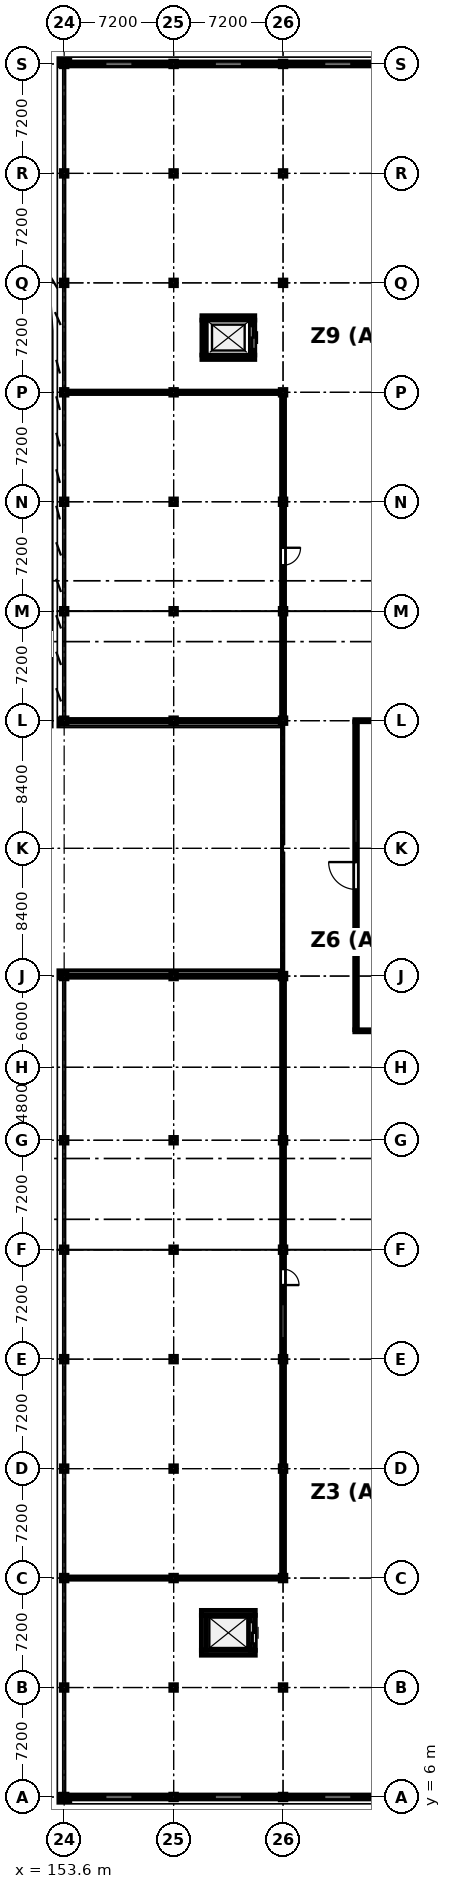
"""IFC4 building model, lengths in metres.
Left out: names, types, materials, properties, quantities, classifications, styles, units other than length and angle.
Written with IfcOpenShell. Run it as: python <this file> out.ifc"""

import sys

from ifc_helpers import new_model, si_unit, direction, frame, frame_2d, origin, origin_2d, place, context, subcontext, project, spatial, rectangle, i_section, extrude, element, fill, save


model = new_model("IFC4")
c1 = context("Model", 3, precision=1e-05, world=origin(), true_north=direction((0.0, 1.0)))
c2 = subcontext(c1, "Body", "Model", "MODEL_VIEW")
j1 = project(units=[si_unit("LENGTHUNIT", "METRE"), si_unit("PLANEANGLEUNIT", "RADIAN")], contexts=[c1])
p1 = place(None, origin())
s1 = spatial("IfcSite", under=j1, at=p1, CompositionType="ELEMENT")
p2 = place(p1, origin())
s2 = spatial("IfcBuilding", under=s1, at=p2, CompositionType="ELEMENT")
p3 = place(p2, frame((0.0, 0.0, 5.4)))
s3 = spatial("IfcBuildingStorey", under=s2, at=p3, CompositionType="ELEMENT", Elevation=5.4)
for number, where, z_axis, x_axis in (
    (1, (153.6, 6.0, 0.0), (0.0, 0.0, 1.0), (1.0, 0.0, 0.0)),
    (2, (153.6, 13.2, 0.0), (0.0, 0.0, 1.0), (1.0, 0.0, 0.0)),
    (3, (153.6, 20.4, 0.0), (0.0, 0.0, 1.0), (1.0, 0.0, 0.0)),
    (4, (153.6, 27.6, 0.0), (0.0, 0.0, 1.0), (1.0, 0.0, 0.0)),
    (5, (153.6, 34.8, 0.0), (0.0, 0.0, 1.0), (1.0, 0.0, 0.0)),
    (6, (153.6, 42.0, 0.0), (0.0, 0.0, 1.0), (1.0, 0.0, 0.0)),
    (7, (153.6, 49.2, 0.0), (0.0, 0.0, 1.0), (1.0, 0.0, 0.0)),
    (8, (153.6, 60.0, 0.0), (0.0, 0.0, 1.0), (1.0, 0.0, 0.0)),
    (9, (153.6, 76.8, 0.0), (0.0, 0.0, 1.0), (1.0, 0.0, 0.0)),
    (10, (153.6, 84.0, 0.0), (0.0, 0.0, 1.0), (1.0, 0.0, 0.0)),
    (11, (153.6, 91.2, 0.0), (0.0, 0.0, 1.0), (1.0, 0.0, 0.0)),
    (12, (153.6, 98.4, 0.0), (0.0, 0.0, 1.0), (1.0, 0.0, 0.0)),
    (13, (153.6, 105.6, 0.0), (0.0, 0.0, 1.0), (1.0, 0.0, 0.0)),
    (14, (153.6, 112.8, 0.0), (0.0, 0.0, 1.0), (1.0, 0.0, 0.0)),
    (15, (153.6, 120.0, 0.0), (0.0, 0.0, 1.0), (1.0, 0.0, 0.0)),
    (16, (160.8, 6.0, 0.0), (0.0, 0.0, 1.0), (1.0, 0.0, 0.0)),
    (17, (160.8, 13.2, 0.0), (0.0, 0.0, 1.0), (1.0, 0.0, 0.0)),
    (18, (160.8, 20.4, 0.0), (0.0, 0.0, 1.0), (1.0, 0.0, 0.0)),
    (19, (160.8, 27.6, 0.0), (0.0, 0.0, 1.0), (1.0, 0.0, 0.0)),
    (20, (160.8, 34.8, 0.0), (0.0, 0.0, 1.0), (1.0, 0.0, 0.0)),
    (21, (160.8, 42.0, 0.0), (0.0, 0.0, 1.0), (1.0, 0.0, 0.0)),
    (22, (160.8, 49.2, 0.0), (0.0, 0.0, 1.0), (1.0, 0.0, 0.0)),
    (23, (160.8, 60.0, 0.0), (0.0, 0.0, 1.0), (1.0, 0.0, 0.0)),
    (24, (160.8, 76.8, 0.0), (0.0, 0.0, 1.0), (1.0, 0.0, 0.0)),
    (25, (160.8, 84.0, 0.0), (0.0, 0.0, 1.0), (1.0, 0.0, 0.0)),
    (26, (160.8, 91.2, 0.0), (0.0, 0.0, 1.0), (1.0, 0.0, 0.0)),
    (27, (160.8, 98.4, 0.0), (0.0, 0.0, 1.0), (1.0, 0.0, 0.0)),
    (28, (160.8, 105.6, 0.0), (0.0, 0.0, 1.0), (1.0, 0.0, 0.0)),
    (29, (160.8, 112.8, 0.0), (0.0, 0.0, 1.0), (1.0, 0.0, 0.0)),
    (30, (160.8, 120.0, 0.0), (0.0, 0.0, 1.0), (1.0, 0.0, 0.0)),
    (31, (168.0, 6.0, 0.0), (0.0, 0.0, 1.0), (1.0, 0.0, 0.0)),
    (32, (168.0, 13.2, 0.0), (0.0, 0.0, 1.0), (1.0, 0.0, 0.0)),
    (33, (168.0, 20.4, 0.0), (0.0, 0.0, 1.0), (1.0, 0.0, 0.0)),
    (34, (168.0, 27.6, 0.0), (0.0, 0.0, 1.0), (1.0, 0.0, 0.0)),
    (35, (168.0, 34.8, 0.0), (0.0, 0.0, 1.0), (1.0, 0.0, 0.0)),
    (36, (168.0, 42.0, 0.0), (0.0, 0.0, 1.0), (1.0, 0.0, 0.0)),
    (37, (168.0, 49.2, 0.0), (0.0, 0.0, 1.0), (1.0, 0.0, 0.0)),
    (38, (168.0, 60.0, 0.0), (0.0, 0.0, 1.0), (1.0, 0.0, 0.0)),
    (39, (168.0, 76.8, 0.0), (0.0, 0.0, 1.0), (1.0, 0.0, 0.0)),
    (40, (168.0, 84.0, 0.0), (0.0, 0.0, 1.0), (1.0, 0.0, 0.0)),
    (41, (168.0, 91.2, 0.0), (0.0, 0.0, 1.0), (1.0, 0.0, 0.0)),
    (42, (168.0, 98.4, 0.0), (0.0, 0.0, 1.0), (1.0, 0.0, 0.0)),
    (43, (168.0, 105.6, 0.0), (0.0, 0.0, 1.0), (1.0, 0.0, 0.0)),
    (44, (168.0, 112.8, 0.0), (0.0, 0.0, 1.0), (1.0, 0.0, 0.0)),
    (45, (168.0, 120.0, 0.0), (0.0, 0.0, 1.0), (1.0, 0.0, 0.0)),
):
    element("IfcColumn", number, at=place(p3, frame(where, z_axis=z_axis, x_axis=x_axis)), inside=s3, PredefinedType="COLUMN", context=c2, shape_type="SweptSolid", body=[
        extrude(i_section(OverallWidth=0.373, OverallDepth=0.373, WebThickness=0.016, FlangeThickness=0.026, FilletRadius=0.015, at=origin_2d()), origin(), (0.0, 0.0, 1.0), 3.9),
    ])
p4 = place(p3, frame((160.606, 6.0, 0.0), z_axis=(0.0, 0.0, 1.0), x_axis=(-1.0, 0.0, 0.0)))
e46 = element("IfcWall", 46, at=p4, inside=s3, PredefinedType="STANDARD", context=c2, shape_type="SweptSolid", body=[
    extrude(rectangle(XDim=6.812, YDim=0.26, at=frame_2d((3.406, 0.0))), origin(), (0.0, 0.0, 1.0), 3.043),
])
p5 = place(p4, frame((2.506, 0.0, 0.9)))
e47 = element("IfcOpeningElement", 47, at=p5, cuts=e46, PredefinedType="OPENING", context=c2, shape_type="SweptSolid", body=[
    extrude(rectangle(XDim=1.8, YDim=1.5, at=frame_2d((0.9, 0.75))), frame((0.0, 0.14, 0.0), z_axis=(0.0, -1.0, 0.0), x_axis=(1.0, 0.0, 0.0)), (0.0, 0.0, 1.0), 0.28),
])
p6 = place(p3, frame((153.794, 120.0, 0.0), z_axis=(0.0, 0.0, 1.0), x_axis=(1.0, 0.0, 0.0)))
e48 = element("IfcWall", 48, at=p6, inside=s3, PredefinedType="STANDARD", context=c2, shape_type="SweptSolid", body=[
    extrude(rectangle(XDim=6.812, YDim=0.26, at=frame_2d((3.406, 0.0))), origin(), (0.0, 0.0, 1.0), 3.043),
])
p7 = place(p6, frame((2.506, 0.0, 0.9)))
e49 = element("IfcOpeningElement", 49, at=p7, cuts=e48, PredefinedType="OPENING", context=c2, shape_type="SweptSolid", body=[
    extrude(rectangle(XDim=1.8, YDim=1.5, at=frame_2d((0.9, 0.75))), frame((0.0, 0.14, 0.0), z_axis=(0.0, -1.0, 0.0), x_axis=(1.0, 0.0, 0.0)), (0.0, 0.0, 1.0), 0.28),
])
p8 = place(p3, frame((167.806, 6.0, 0.0), z_axis=(0.0, 0.0, 1.0), x_axis=(-1.0, 0.0, 0.0)))
e50 = element("IfcWall", 50, at=p8, inside=s3, PredefinedType="STANDARD", context=c2, shape_type="SweptSolid", body=[
    extrude(rectangle(XDim=6.812, YDim=0.26, at=frame_2d((3.406, 0.0))), origin(), (0.0, 0.0, 1.0), 3.043),
])
p9 = place(p8, frame((2.506, 0.0, 0.9)))
e51 = element("IfcOpeningElement", 51, at=p9, cuts=e50, PredefinedType="OPENING", context=c2, shape_type="SweptSolid", body=[
    extrude(rectangle(XDim=1.8, YDim=1.5, at=frame_2d((0.9, 0.75))), frame((0.0, 0.14, 0.0), z_axis=(0.0, -1.0, 0.0), x_axis=(1.0, 0.0, 0.0)), (0.0, 0.0, 1.0), 0.28),
])
p10 = place(p3, frame((160.994, 120.0, 0.0), z_axis=(0.0, 0.0, 1.0), x_axis=(1.0, 0.0, 0.0)))
e52 = element("IfcWall", 52, at=p10, inside=s3, PredefinedType="STANDARD", context=c2, shape_type="SweptSolid", body=[
    extrude(rectangle(XDim=6.812, YDim=0.26, at=frame_2d((3.406, 0.0))), origin(), (0.0, 0.0, 1.0), 3.043),
])
p11 = place(p10, frame((2.506, 0.0, 0.9)))
e53 = element("IfcOpeningElement", 53, at=p11, cuts=e52, PredefinedType="OPENING", context=c2, shape_type="SweptSolid", body=[
    extrude(rectangle(XDim=1.8, YDim=1.5, at=frame_2d((0.9, 0.75))), frame((0.0, 0.14, 0.0), z_axis=(0.0, -1.0, 0.0), x_axis=(1.0, 0.0, 0.0)), (0.0, 0.0, 1.0), 0.28),
])
p12 = place(p3, frame((175.006, 6.0, 0.0), z_axis=(0.0, 0.0, 1.0), x_axis=(-1.0, 0.0, 0.0)))
e54 = element("IfcWall", 54, at=p12, inside=s3, PredefinedType="STANDARD", context=c2, shape_type="SweptSolid", body=[
    extrude(rectangle(XDim=6.812, YDim=0.26, at=frame_2d((3.406, 0.0))), origin(), (0.0, 0.0, 1.0), 3.043),
])
p13 = place(p12, frame((2.506, 0.0, 0.9)))
e55 = element("IfcOpeningElement", 55, at=p13, cuts=e54, PredefinedType="OPENING", context=c2, shape_type="SweptSolid", body=[
    extrude(rectangle(XDim=1.8, YDim=1.5, at=frame_2d((0.9, 0.75))), frame((0.0, 0.14, 0.0), z_axis=(0.0, -1.0, 0.0), x_axis=(1.0, 0.0, 0.0)), (0.0, 0.0, 1.0), 0.28),
])
p14 = place(p3, frame((168.194, 120.0, 0.0), z_axis=(0.0, 0.0, 1.0), x_axis=(1.0, 0.0, 0.0)))
e56 = element("IfcWall", 56, at=p14, inside=s3, PredefinedType="STANDARD", context=c2, shape_type="SweptSolid", body=[
    extrude(rectangle(XDim=6.812, YDim=0.26, at=frame_2d((3.406, 0.0))), origin(), (0.0, 0.0, 1.0), 3.043),
])
p15 = place(p14, frame((2.506, 0.0, 0.9)))
e57 = element("IfcOpeningElement", 57, at=p15, cuts=e56, PredefinedType="OPENING", context=c2, shape_type="SweptSolid", body=[
    extrude(rectangle(XDim=1.8, YDim=1.5, at=frame_2d((0.9, 0.75))), frame((0.0, 0.14, 0.0), z_axis=(0.0, -1.0, 0.0), x_axis=(1.0, 0.0, 0.0)), (0.0, 0.0, 1.0), 0.28),
])
for number, where, z_axis, x_axis in (
    (58, (166.175, 15.488, 0.0), (0.0, 0.0, 1.0), (-1.0, 0.0, 0.0)),
    (59, (162.625, 18.112, 0.0), (0.0, 0.0, 1.0), (1.0, 0.0, 0.0)),
):
    element("IfcWall", number, at=place(p3, frame(where, z_axis=z_axis, x_axis=x_axis)), inside=s3, PredefinedType="SHEAR", context=c2, shape_type="SweptSolid", body=[
        extrude(rectangle(XDim=3.55, YDim=0.325, at=frame_2d((1.775, 0.0))), origin(), (0.0, 0.0, 1.0), 3.67),
    ])
p16 = place(p3, frame((162.788, 15.65, 0.0), z_axis=(0.0, 0.0, 1.0), x_axis=(0.0, 1.0, 0.0)))
e60 = element("IfcWall", 60, at=p16, inside=s3, PredefinedType="SHEAR", context=c2, shape_type="SweptSolid", body=[
    extrude(rectangle(XDim=2.3, YDim=0.325, at=frame_2d((1.15, 0.0))), origin(), (0.0, 0.0, 1.0), 3.67),
])
p17 = place(p3, frame((166.012, 17.95, 0.0), z_axis=(0.0, 0.0, 1.0), x_axis=(0.0, -1.0, 0.0)))
e61 = element("IfcWall", 61, at=p17, inside=s3, PredefinedType="SHEAR", context=c2, shape_type="SweptSolid", body=[
    extrude(rectangle(XDim=2.3, YDim=0.325, at=frame_2d((1.15, 0.0))), origin(), (0.0, 0.0, 1.0), 3.67),
])
p18 = place(p17, frame((0.45, 0.0, 0.0)))
e62 = element("IfcOpeningElement", 62, at=p18, cuts=e61, PredefinedType="OPENING", context=c2, shape_type="SweptSolid", body=[
    extrude(rectangle(XDim=1.4, YDim=2.3, at=frame_2d((0.7, 1.15))), frame((0.0, 0.172, 0.0), z_axis=(0.0, -1.0, 0.0), x_axis=(1.0, 0.0, 0.0)), (0.0, 0.0, 1.0), 0.345),
])
for number, where, z_axis, x_axis in (
    (63, (166.14, 100.705, 0.0), (0.0, 0.0, 1.0), (-1.0, 0.0, 0.0)),
    (64, (162.66, 103.295, 0.0), (0.0, 0.0, 1.0), (1.0, 0.0, 0.0)),
):
    element("IfcWall", number, at=place(p3, frame(where, z_axis=z_axis, x_axis=x_axis)), inside=s3, PredefinedType="SHEAR", context=c2, shape_type="SweptSolid", body=[
        extrude(rectangle(XDim=3.48, YDim=0.29, at=frame_2d((1.74, 0.0))), origin(), (0.0, 0.0, 1.0), 3.67),
    ])
p19 = place(p3, frame((162.805, 100.85, 0.0), z_axis=(0.0, 0.0, 1.0), x_axis=(0.0, 1.0, 0.0)))
e65 = element("IfcWall", 65, at=p19, inside=s3, PredefinedType="SHEAR", context=c2, shape_type="SweptSolid", body=[
    extrude(rectangle(XDim=2.3, YDim=0.29, at=frame_2d((1.15, 0.0))), origin(), (0.0, 0.0, 1.0), 3.67),
])
p20 = place(p3, frame((165.995, 103.15, 0.0), z_axis=(0.0, 0.0, 1.0), x_axis=(0.0, -1.0, 0.0)))
e66 = element("IfcWall", 66, at=p20, inside=s3, PredefinedType="SHEAR", context=c2, shape_type="SweptSolid", body=[
    extrude(rectangle(XDim=2.3, YDim=0.29, at=frame_2d((1.15, 0.0))), origin(), (0.0, 0.0, 1.0), 3.67),
])
p21 = place(p20, frame((0.4, 0.0, 0.0)))
e67 = element("IfcOpeningElement", 67, at=p21, cuts=e66, PredefinedType="OPENING", context=c2, shape_type="SweptSolid", body=[
    extrude(rectangle(XDim=1.5, YDim=2.3, at=frame_2d((0.75, 1.15))), frame((0.0, 0.155, 0.0), z_axis=(0.0, -1.0, 0.0), x_axis=(1.0, 0.0, 0.0)), (0.0, 0.0, 1.0), 0.31),
])
p22 = place(p3, frame((203.868, 56.4, 0.0), z_axis=(0.0, 0.0, 1.0), x_axis=(-1.0, 0.0, 0.0)))
e68 = element("IfcWall", 68, at=p22, inside=s3, PredefinedType="PARTITIONING", context=c2, shape_type="SweptSolid", body=[
    extrude(rectangle(XDim=31.148, YDim=0.135, at=frame_2d((15.574, 0.0))), origin(), (0.0, 0.0, 1.0), 3.038),
])
p23 = place(p3, frame((172.72, 76.8, 0.0), z_axis=(0.0, 0.0, 1.0), x_axis=(1.0, 0.0, 0.0)))
e69 = element("IfcWall", 69, at=p23, inside=s3, PredefinedType="PARTITIONING", context=c2, shape_type="SweptSolid", body=[
    extrude(rectangle(XDim=31.148, YDim=0.14, at=frame_2d((15.574, 0.0))), origin(), (0.0, 0.0, 1.0), 3.038),
])
p24 = place(p3, frame((168.08, 20.4, 0.0), z_axis=(0.0, 0.0, 1.0), x_axis=(-1.0, 0.0, 0.0)))
e70 = element("IfcWall", 70, at=p24, inside=s3, PredefinedType="PARTITIONING", context=c2, shape_type="SweptSolid", body=[
    extrude(rectangle(XDim=14.348, YDim=0.15, at=frame_2d((7.174, 0.0))), origin(), (0.0, 0.0, 1.0), 3.038),
])
p25 = place(p3, frame((153.732, 60.0, 0.0), z_axis=(0.0, 0.0, 1.0), x_axis=(1.0, 0.0, 0.0)))
e71 = element("IfcWall", 71, at=p25, inside=s3, PredefinedType="PARTITIONING", context=c2, shape_type="SweptSolid", body=[
    extrude(rectangle(XDim=14.348, YDim=0.155, at=frame_2d((7.174, 0.0))), origin(), (0.0, 0.0, 1.0), 3.038),
])
p26 = place(p3, frame((168.08, 76.8, 0.0), z_axis=(0.0, 0.0, 1.0), x_axis=(-1.0, 0.0, 0.0)))
e72 = element("IfcWall", 72, at=p26, inside=s3, PredefinedType="PARTITIONING", context=c2, shape_type="SweptSolid", body=[
    extrude(rectangle(XDim=14.348, YDim=0.16, at=frame_2d((7.174, 0.0))), origin(), (0.0, 0.0, 1.0), 3.038),
])
p27 = place(p3, frame((153.732, 98.4, 0.0), z_axis=(0.0, 0.0, 1.0), x_axis=(1.0, 0.0, 0.0)))
e73 = element("IfcWall", 73, at=p27, inside=s3, PredefinedType="PARTITIONING", context=c2, shape_type="SweptSolid", body=[
    extrude(rectangle(XDim=14.348, YDim=0.165, at=frame_2d((7.174, 0.0))), origin(), (0.0, 0.0, 1.0), 3.038),
])
p28 = place(p3, frame((172.8, 56.47, 0.0), z_axis=(0.0, 0.0, 1.0), x_axis=(0.0, 1.0, 0.0)))
e74 = element("IfcWall", 74, at=p28, inside=s3, PredefinedType="PARTITIONING", context=c2, shape_type="SweptSolid", body=[
    extrude(rectangle(XDim=20.258, YDim=0.178, at=frame_2d((10.129, 0.0))), origin(), (0.0, 0.0, 1.0), 3.038),
])
p29 = place(p28, frame((9.229, 0.0, 0.0)))
e75 = element("IfcOpeningElement", 75, at=p29, cuts=e74, PredefinedType="OPENING", context=c2, shape_type="SweptSolid", body=[
    extrude(rectangle(XDim=1.8, YDim=2.28, at=frame_2d((0.9, 1.14))), frame((0.0, 0.099, 0.0), z_axis=(0.0, -1.0, 0.0), x_axis=(1.0, 0.0, 0.0)), (0.0, 0.0, 1.0), 0.198),
])
p30 = place(p28, frame((12.279, 0.0, 0.95)))
e76 = element("IfcOpeningElement", 76, at=p30, cuts=e74, PredefinedType="OPENING", context=c2, shape_type="SweptSolid", body=[
    extrude(rectangle(XDim=1.6, YDim=1.45, at=frame_2d((0.8, 0.725))), frame((0.0, 0.099, 0.0), z_axis=(0.0, -1.0, 0.0), x_axis=(1.0, 0.0, 0.0)), (0.0, 0.0, 1.0), 0.198),
])
p31 = place(p3, frame((168.0, 59.92, 0.0), z_axis=(0.0, 0.0, 1.0), x_axis=(0.0, -1.0, 0.0)))
e77 = element("IfcWall", 77, at=p31, inside=s3, PredefinedType="PARTITIONING", context=c2, shape_type="SweptSolid", body=[
    extrude(rectangle(XDim=39.443, YDim=0.192, at=frame_2d((19.721, 0.0))), origin(), (0.0, 0.0, 1.0), 3.038),
])
p32 = place(p31, frame((19.196, 0.0, 0.0)))
e78 = element("IfcOpeningElement", 78, at=p32, cuts=e77, PredefinedType="OPENING", context=c2, shape_type="SweptSolid", body=[
    extrude(rectangle(XDim=1.05, YDim=2.34, at=frame_2d((0.525, 1.17))), frame((0.0, 0.106, 0.0), z_axis=(0.0, -1.0, 0.0), x_axis=(1.0, 0.0, 0.0)), (0.0, 0.0, 1.0), 0.212),
])
p33 = place(p31, frame((21.496, 0.0, 0.95)))
e79 = element("IfcOpeningElement", 79, at=p33, cuts=e77, PredefinedType="OPENING", context=c2, shape_type="SweptSolid", body=[
    extrude(rectangle(XDim=2.25, YDim=1.45, at=frame_2d((1.125, 0.725))), frame((0.0, 0.106, 0.0), z_axis=(0.0, -1.0, 0.0), x_axis=(1.0, 0.0, 0.0)), (0.0, 0.0, 1.0), 0.212),
])
p34 = place(p3, frame((168.0, 98.316, 0.0), z_axis=(0.0, 0.0, 1.0), x_axis=(0.0, -1.0, 0.0)))
e80 = element("IfcWall", 80, at=p34, inside=s3, PredefinedType="PARTITIONING", context=c2, shape_type="SweptSolid", body=[
    extrude(rectangle(XDim=21.434, YDim=0.198, at=frame_2d((10.717, 0.0))), origin(), (0.0, 0.0, 1.0), 3.038),
])
p35 = place(p34, frame((10.142, 0.0, 0.0)))
e81 = element("IfcOpeningElement", 81, at=p35, cuts=e80, PredefinedType="OPENING", context=c2, shape_type="SweptSolid", body=[
    extrude(rectangle(XDim=1.15, YDim=2.34, at=frame_2d((0.575, 1.17))), frame((0.0, 0.109, 0.0), z_axis=(0.0, -1.0, 0.0), x_axis=(1.0, 0.0, 0.0)), (0.0, 0.0, 1.0), 0.218),
])
p36 = place(p5, origin())
e82 = element("IfcWindow", 82, at=p36, inside=s3, PartitioningType="SINGLE_PANEL", PredefinedType="WINDOW", context=c2, shape_type="SweptSolid", body=[
    extrude(rectangle(XDim=1.8, YDim=1.5, at=frame_2d((0.9, 0.75))), frame((0.0, 0.03, 0.0), z_axis=(0.0, -1.0, 0.0), x_axis=(1.0, 0.0, 0.0)), (0.0, 0.0, 1.0), 0.06),
])
fill(e47, e82)
p37 = place(p7, origin())
e83 = element("IfcWindow", 83, at=p37, inside=s3, PartitioningType="SINGLE_PANEL", PredefinedType="WINDOW", context=c2, shape_type="SweptSolid", body=[
    extrude(rectangle(XDim=1.8, YDim=1.5, at=frame_2d((0.9, 0.75))), frame((0.0, 0.03, 0.0), z_axis=(0.0, -1.0, 0.0), x_axis=(1.0, 0.0, 0.0)), (0.0, 0.0, 1.0), 0.06),
])
fill(e49, e83)
p38 = place(p9, origin())
e84 = element("IfcWindow", 84, at=p38, inside=s3, PartitioningType="SINGLE_PANEL", PredefinedType="WINDOW", context=c2, shape_type="SweptSolid", body=[
    extrude(rectangle(XDim=1.8, YDim=1.5, at=frame_2d((0.9, 0.75))), frame((0.0, 0.03, 0.0), z_axis=(0.0, -1.0, 0.0), x_axis=(1.0, 0.0, 0.0)), (0.0, 0.0, 1.0), 0.06),
])
fill(e51, e84)
p39 = place(p11, origin())
e85 = element("IfcWindow", 85, at=p39, inside=s3, PartitioningType="SINGLE_PANEL", PredefinedType="WINDOW", context=c2, shape_type="SweptSolid", body=[
    extrude(rectangle(XDim=1.8, YDim=1.5, at=frame_2d((0.9, 0.75))), frame((0.0, 0.03, 0.0), z_axis=(0.0, -1.0, 0.0), x_axis=(1.0, 0.0, 0.0)), (0.0, 0.0, 1.0), 0.06),
])
fill(e53, e85)
p40 = place(p13, origin())
e86 = element("IfcWindow", 86, at=p40, inside=s3, PartitioningType="SINGLE_PANEL", PredefinedType="WINDOW", context=c2, shape_type="SweptSolid", body=[
    extrude(rectangle(XDim=1.8, YDim=1.5, at=frame_2d((0.9, 0.75))), frame((0.0, 0.03, 0.0), z_axis=(0.0, -1.0, 0.0), x_axis=(1.0, 0.0, 0.0)), (0.0, 0.0, 1.0), 0.06),
])
fill(e55, e86)
p41 = place(p15, origin())
e87 = element("IfcWindow", 87, at=p41, inside=s3, PartitioningType="SINGLE_PANEL", PredefinedType="WINDOW", context=c2, shape_type="SweptSolid", body=[
    extrude(rectangle(XDim=1.8, YDim=1.5, at=frame_2d((0.9, 0.75))), frame((0.0, 0.03, 0.0), z_axis=(0.0, -1.0, 0.0), x_axis=(1.0, 0.0, 0.0)), (0.0, 0.0, 1.0), 0.06),
])
fill(e57, e87)
p42 = place(p18, origin())
e88 = element("IfcDoor", 88, at=p42, inside=s3, OperationType="DOUBLE_DOOR_SLIDING", PredefinedType="DOOR", context=c2, shape_type="SweptSolid", body=[
    extrude(rectangle(XDim=1.4, YDim=2.3, at=frame_2d((0.7, 1.15))), frame((0.0, 0.025, 0.0), z_axis=(0.0, -1.0, 0.0), x_axis=(1.0, 0.0, 0.0)), (0.0, 0.0, 1.0), 0.05),
])
fill(e62, e88)
p43 = place(p21, origin())
e89 = element("IfcDoor", 89, at=p43, inside=s3, OperationType="DOUBLE_DOOR_SLIDING", PredefinedType="DOOR", context=c2, shape_type="SweptSolid", body=[
    extrude(rectangle(XDim=1.5, YDim=2.3, at=frame_2d((0.75, 1.15))), frame((0.0, 0.025, 0.0), z_axis=(0.0, -1.0, 0.0), x_axis=(1.0, 0.0, 0.0)), (0.0, 0.0, 1.0), 0.05),
])
fill(e67, e89)
p44 = place(p29, origin())
e90 = element("IfcDoor", 90, at=p44, inside=s3, OperationType="SINGLE_SWING_RIGHT", PredefinedType="DOOR", context=c2, shape_type="SweptSolid", body=[
    extrude(rectangle(XDim=1.8, YDim=2.28, at=frame_2d((0.9, 1.14))), frame((0.0, 0.025, 0.0), z_axis=(0.0, -1.0, 0.0), x_axis=(1.0, 0.0, 0.0)), (0.0, 0.0, 1.0), 0.05),
])
fill(e75, e90)
p45 = place(p30, origin())
e91 = element("IfcWindow", 91, at=p45, inside=s3, PartitioningType="SINGLE_PANEL", PredefinedType="WINDOW", context=c2, shape_type="SweptSolid", body=[
    extrude(rectangle(XDim=1.6, YDim=1.45, at=frame_2d((0.8, 0.725))), frame((0.0, 0.03, 0.0), z_axis=(0.0, -1.0, 0.0), x_axis=(1.0, 0.0, 0.0)), (0.0, 0.0, 1.0), 0.06),
])
fill(e76, e91)
p46 = place(p32, origin())
e92 = element("IfcDoor", 92, at=p46, inside=s3, OperationType="SINGLE_SWING_RIGHT", PredefinedType="DOOR", context=c2, shape_type="SweptSolid", body=[
    extrude(rectangle(XDim=1.05, YDim=2.34, at=frame_2d((0.525, 1.17))), frame((0.0, 0.025, 0.0), z_axis=(0.0, -1.0, 0.0), x_axis=(1.0, 0.0, 0.0)), (0.0, 0.0, 1.0), 0.05),
])
fill(e78, e92)
p47 = place(p33, origin())
e93 = element("IfcWindow", 93, at=p47, inside=s3, PartitioningType="SINGLE_PANEL", PredefinedType="WINDOW", context=c2, shape_type="SweptSolid", body=[
    extrude(rectangle(XDim=2.25, YDim=1.45, at=frame_2d((1.125, 0.725))), frame((0.0, 0.03, 0.0), z_axis=(0.0, -1.0, 0.0), x_axis=(1.0, 0.0, 0.0)), (0.0, 0.0, 1.0), 0.06),
])
fill(e79, e93)
p48 = place(p35, origin())
e94 = element("IfcDoor", 94, at=p48, inside=s3, OperationType="SINGLE_SWING_LEFT", PredefinedType="DOOR", context=c2, shape_type="SweptSolid", body=[
    extrude(rectangle(XDim=1.15, YDim=2.34, at=frame_2d((0.575, 1.17))), frame((0.0, 0.025, 0.0), z_axis=(0.0, -1.0, 0.0), x_axis=(1.0, 0.0, 0.0)), (0.0, 0.0, 1.0), 0.05),
])
fill(e81, e94)
save(model, sys.argv[1])
